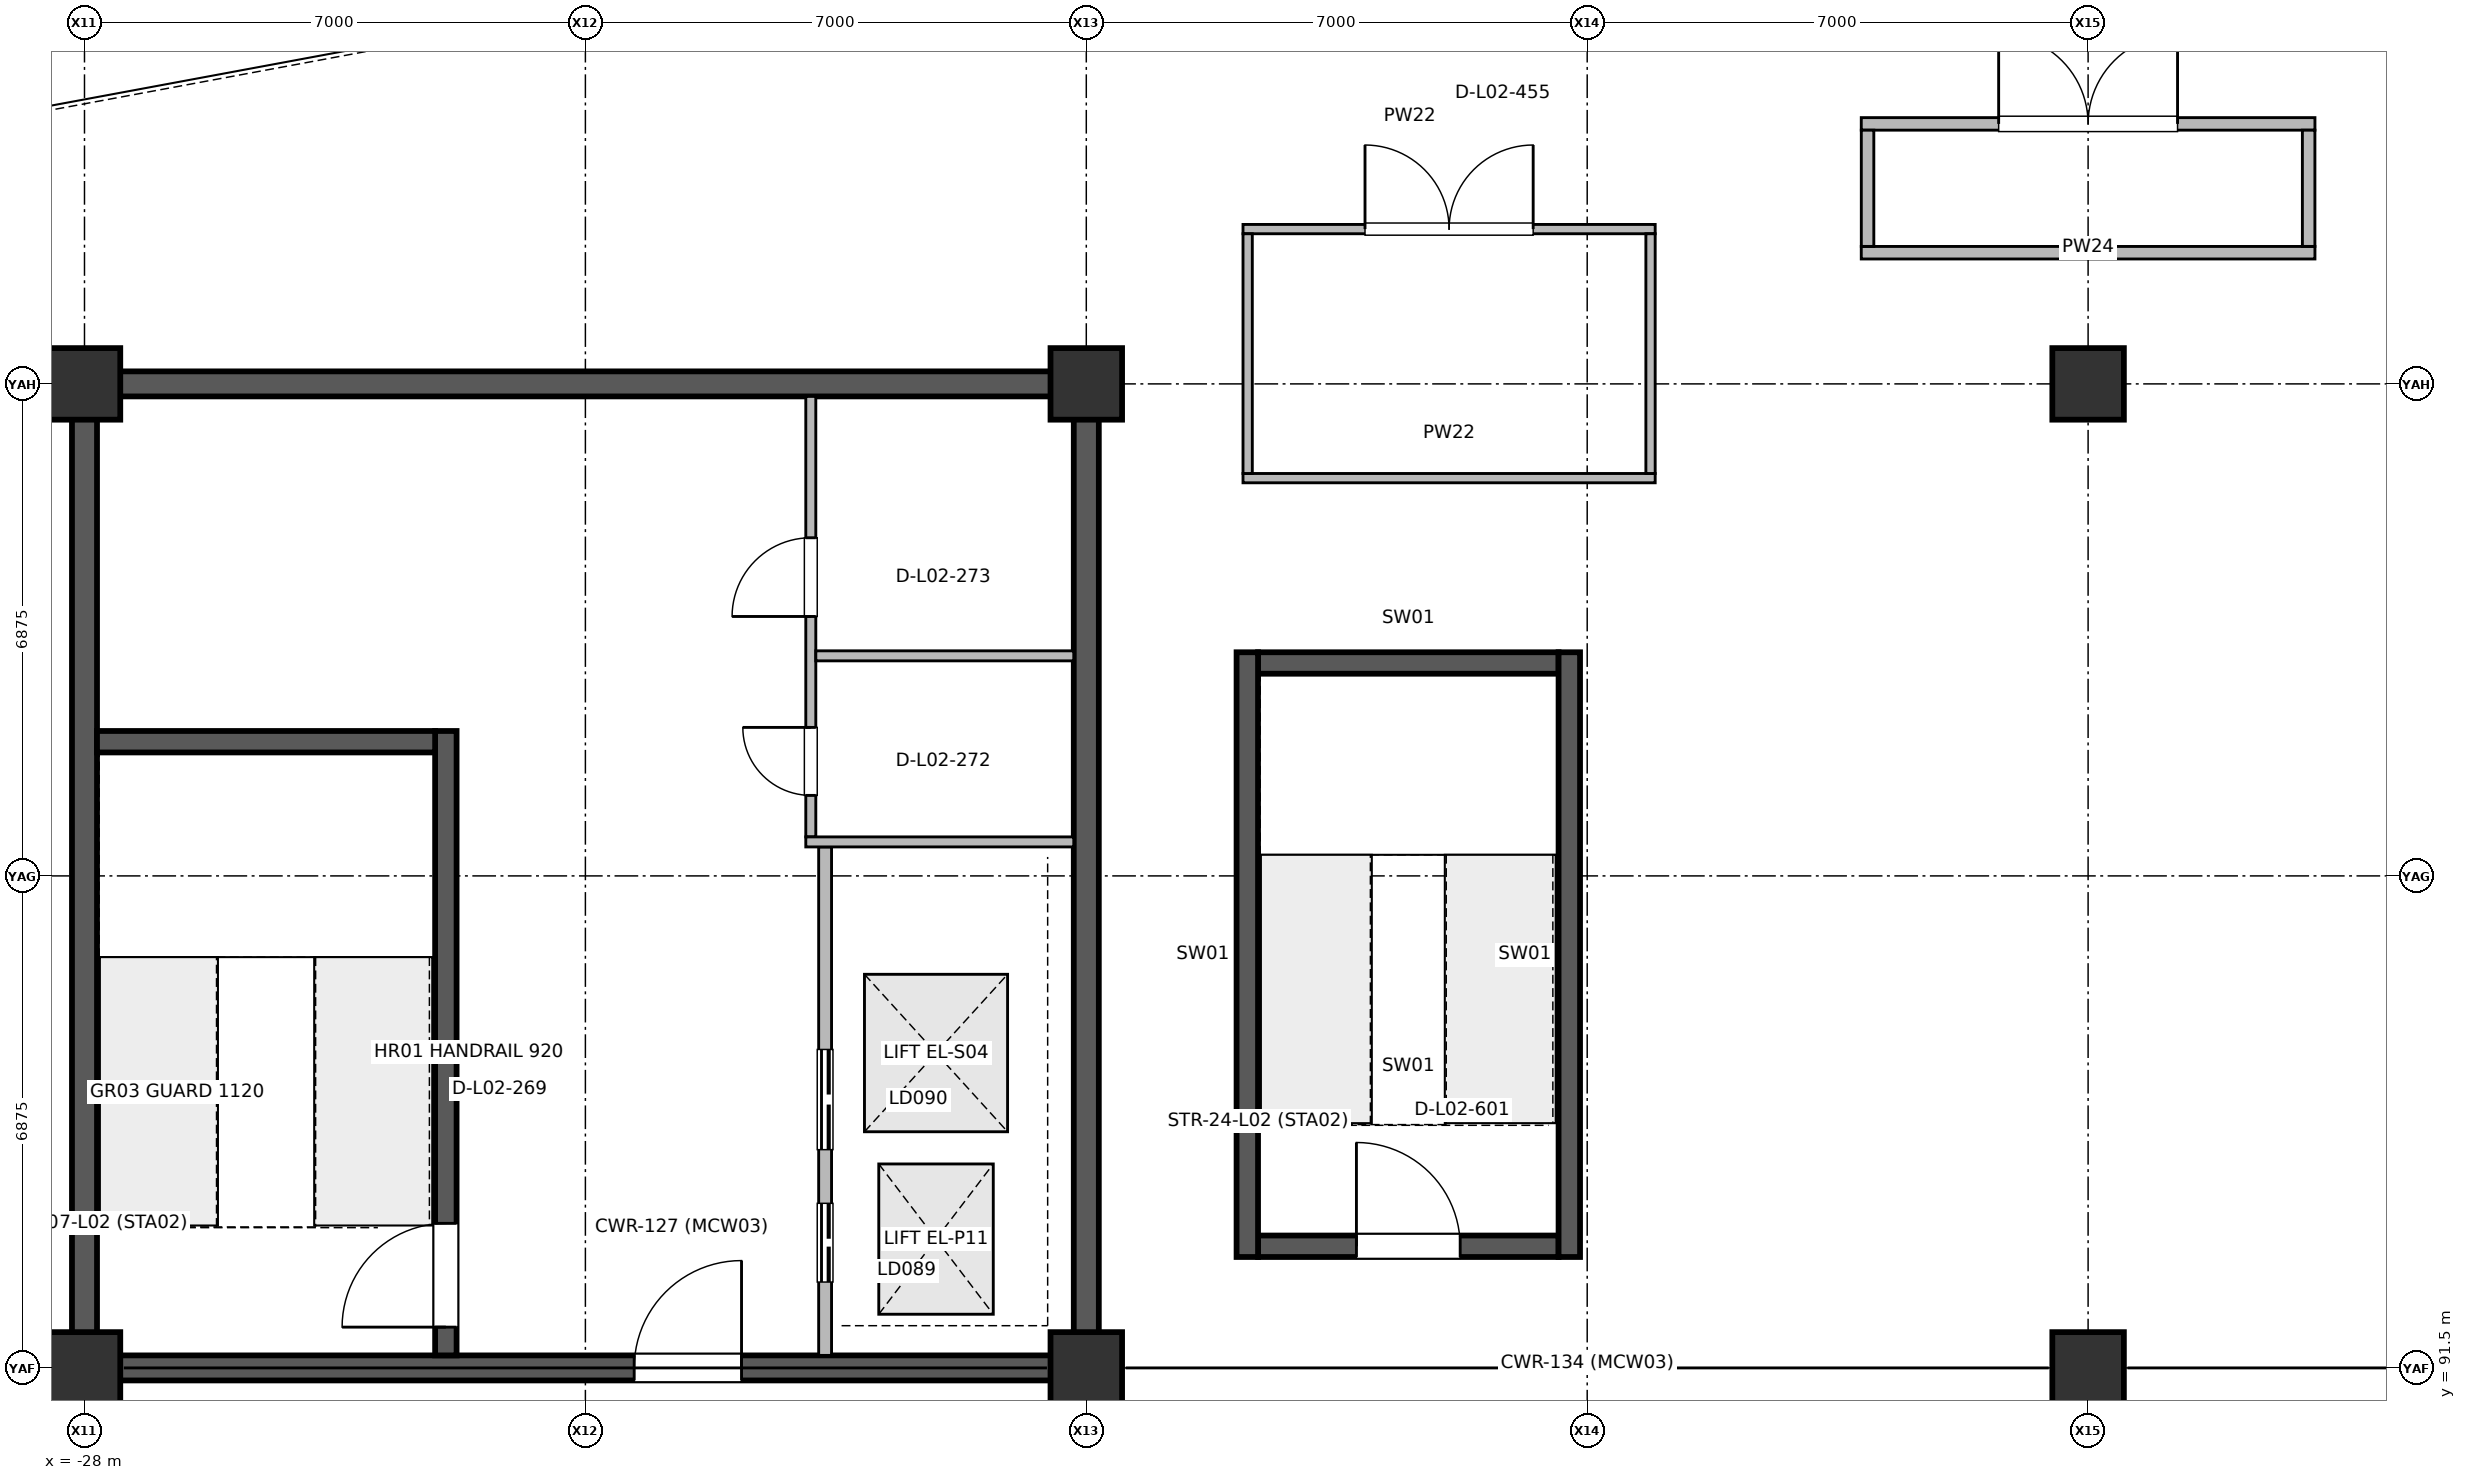
"""IFC4 building model, lengths in metres.
Left out: names, types, materials, properties, quantities, classifications, styles, units other than length and angle.
Written with IfcOpenShell. Run it as: python <this file> out.ifc"""

import sys

from ifc_helpers import new_model, si_unit, direction, frame, frame_2d, origin, origin_2d, place, context, subcontext, project, spatial, rectangle, circle, extrude, element, fill, save


model = new_model("IFC4")
c1 = context("Model", 3, precision=1e-05, world=origin(), true_north=direction((0.0, 1.0)))
c2 = subcontext(c1, "Body", "Model", "MODEL_VIEW")
j1 = project(units=[si_unit("LENGTHUNIT", "METRE"), si_unit("PLANEANGLEUNIT", "RADIAN")], contexts=[c1])
p1 = place(None, origin())
s1 = spatial("IfcSite", under=j1, at=p1, CompositionType="ELEMENT")
p2 = place(p1, origin())
s2 = spatial("IfcBuilding", under=s1, at=p2, CompositionType="ELEMENT")
p3 = place(p2, frame((0.0, 0.0, 6.0)))
s3 = spatial("IfcBuildingStorey", under=s2, at=p3, CompositionType="ELEMENT", Elevation=6.0)
for number, where, z_axis, x_axis in (
    (1, (-28.0, 91.5, 0.0), (0.0, 0.0, 1.0), (1.0, 0.0, 0.0)),
    (2, (-28.0, 105.25, 0.0), (0.0, 0.0, 1.0), (1.0, 0.0, 0.0)),
    (3, (-14.0, 91.5, 0.0), (0.0, 0.0, 1.0), (1.0, 0.0, 0.0)),
    (4, (-14.0, 105.25, 0.0), (0.0, 0.0, 1.0), (1.0, 0.0, 0.0)),
    (5, (0.0, 91.5, 0.0), (0.0, 0.0, 1.0), (1.0, 0.0, 0.0)),
    (6, (0.0, 105.25, 0.0), (0.0, 0.0, 1.0), (1.0, 0.0, 0.0)),
):
    element("IfcColumn", number, at=place(p3, frame(where, z_axis=z_axis, x_axis=x_axis)), inside=s3, PredefinedType="COLUMN", context=c2, shape_type="SweptSolid", body=[
        extrude(circle(Radius=0.5, at=origin_2d()), origin(), (0.0, 0.0, 1.0), 5.398),
    ])
for number, where, z_axis, x_axis in (
    (7, (-28.0, 91.675, 0.0), (0.0, 0.0, 1.0), (0.0, 1.0, 0.0)),
    (8, (-14.0, 91.675, 0.0), (0.0, 0.0, 1.0), (0.0, 1.0, 0.0)),
):
    element("IfcWall", number, at=place(p3, frame(where, z_axis=z_axis, x_axis=x_axis)), inside=s3, PredefinedType="SHEAR", context=c2, shape_type="SweptSolid", body=[
        extrude(rectangle(XDim=13.4, YDim=0.35, at=frame_2d((6.7, 0.0))), origin(), (0.0, 0.0, 1.0), 5.2),
    ])
p4 = place(p3, frame((-27.825, 91.5, 0.0), z_axis=(0.0, 0.0, 1.0), x_axis=(1.0, 0.0, 0.0)))
e9 = element("IfcWall", 9, at=p4, inside=s3, PredefinedType="SHEAR", context=c2, shape_type="SweptSolid", body=[
    extrude(rectangle(XDim=13.65, YDim=0.35, at=frame_2d((6.825, 0.0))), origin(), (0.0, 0.0, 1.0), 5.2),
])
p5 = place(p4, frame((7.507, 0.0, 0.0)))
e10 = element("IfcOpeningElement", 10, at=p5, cuts=e9, PredefinedType="OPENING", context=c2, shape_type="SweptSolid", body=[
    extrude(rectangle(XDim=1.5, YDim=2.2, at=frame_2d((0.75, 1.1))), frame((0.0, 0.185, 0.0), z_axis=(0.0, -1.0, 0.0), x_axis=(1.0, 0.0, 0.0)), (0.0, 0.0, 1.0), 0.37),
])
p6 = place(p3, frame((-27.825, 105.25, 0.0), z_axis=(0.0, 0.0, 1.0), x_axis=(1.0, 0.0, 0.0)))
e11 = element("IfcWall", 11, at=p6, inside=s3, PredefinedType="SHEAR", context=c2, shape_type="SweptSolid", body=[
    extrude(rectangle(XDim=13.65, YDim=0.35, at=frame_2d((6.825, 0.0))), origin(), (0.0, 0.0, 1.0), 5.2),
])
p7 = place(p3, frame((-22.95, 91.675, 0.0), z_axis=(0.0, 0.0, 1.0), x_axis=(0.0, 1.0, 0.0)))
e12 = element("IfcWall", 12, at=p7, inside=s3, PredefinedType="SHEAR", context=c2, shape_type="SweptSolid", body=[
    extrude(rectangle(XDim=8.725, YDim=0.3, at=frame_2d((4.362, 0.0))), origin(), (0.0, 0.0, 1.0), 5.2),
])
p8 = place(p7, frame((0.395, 0.0, 0.0)))
e13 = element("IfcOpeningElement", 13, at=p8, cuts=e12, PredefinedType="OPENING", context=c2, shape_type="SweptSolid", body=[
    extrude(rectangle(XDim=1.45, YDim=2.2, at=frame_2d((0.725, 1.1))), frame((0.0, 0.16, 0.0), z_axis=(0.0, -1.0, 0.0), x_axis=(1.0, 0.0, 0.0)), (0.0, 0.0, 1.0), 0.32),
])
p9 = place(p3, frame((-17.65, 91.675, 0.0), z_axis=(0.0, 0.0, 1.0), x_axis=(0.0, 1.0, 0.0)))
e14 = element("IfcWall", 14, at=p9, inside=s3, PredefinedType="PARTITIONING", context=c2, shape_type="SweptSolid", body=[
    extrude(rectangle(XDim=7.105, YDim=0.18, at=frame_2d((3.552, 0.0))), origin(), (0.0, 0.0, 1.0), 4.42),
])
p10 = place(p9, frame((1.025, 0.0, 0.0)))
e15 = element("IfcOpeningElement", 15, at=p10, cuts=e14, PredefinedType="OPENING", context=c2, shape_type="SweptSolid", body=[
    extrude(rectangle(XDim=1.1, YDim=2.2, at=frame_2d((0.55, 1.1))), frame((0.0, 0.1, 0.0), z_axis=(0.0, -1.0, 0.0), x_axis=(1.0, 0.0, 0.0)), (0.0, 0.0, 1.0), 0.2),
])
p11 = place(p9, frame((2.875, 0.0, 0.0)))
e16 = element("IfcOpeningElement", 16, at=p11, cuts=e14, PredefinedType="OPENING", context=c2, shape_type="SweptSolid", body=[
    extrude(rectangle(XDim=1.4, YDim=2.3, at=frame_2d((0.7, 1.15))), frame((0.0, 0.1, 0.0), z_axis=(0.0, -1.0, 0.0), x_axis=(1.0, 0.0, 0.0)), (0.0, 0.0, 1.0), 0.2),
])
p12 = place(p3, frame((-17.85, 98.92, 0.0), z_axis=(0.0, 0.0, 1.0), x_axis=(0.0, 1.0, 0.0)))
e17 = element("IfcWall", 17, at=p12, inside=s3, PredefinedType="PARTITIONING", context=c2, shape_type="SweptSolid", body=[
    extrude(rectangle(XDim=6.155, YDim=0.14, at=frame_2d((3.078, 0.0))), origin(), (0.0, 0.0, 1.0), 4.42),
])
p13 = place(p12, frame((0.58, 0.0, 0.0)))
e18 = element("IfcOpeningElement", 18, at=p13, cuts=e17, PredefinedType="OPENING", context=c2, shape_type="SweptSolid", body=[
    extrude(rectangle(XDim=0.95, YDim=2.15, at=frame_2d((0.475, 1.075))), frame((0.0, 0.08, 0.0), z_axis=(0.0, -1.0, 0.0), x_axis=(1.0, 0.0, 0.0)), (0.0, 0.0, 1.0), 0.16),
])
p14 = place(p12, frame((3.08, 0.0, 0.0)))
e19 = element("IfcOpeningElement", 19, at=p14, cuts=e17, PredefinedType="OPENING", context=c2, shape_type="SweptSolid", body=[
    extrude(rectangle(XDim=1.1, YDim=2.15, at=frame_2d((0.55, 1.075))), frame((0.0, 0.08, 0.0), z_axis=(0.0, -1.0, 0.0), x_axis=(1.0, 0.0, 0.0)), (0.0, 0.0, 1.0), 0.16),
])
p15 = place(p3, frame((-11.81, 107.413, 0.0), z_axis=(0.0, 0.0, 1.0), x_axis=(1.0, 0.0, 0.0)))
e20 = element("IfcWall", 20, at=p15, inside=s3, PredefinedType="PARTITIONING", context=c2, shape_type="SweptSolid", body=[
    extrude(rectangle(XDim=5.76, YDim=0.13, at=frame_2d((2.88, 0.0))), origin(), (0.0, 0.0, 1.0), 4.42),
])
p16 = place(p15, frame((1.705, 0.0, 0.0)))
e21 = element("IfcOpeningElement", 21, at=p16, cuts=e20, PredefinedType="OPENING", context=c2, shape_type="SweptSolid", body=[
    extrude(rectangle(XDim=2.35, YDim=2.5, at=frame_2d((1.175, 1.25))), frame((0.0, 0.075, 0.0), z_axis=(0.0, -1.0, 0.0), x_axis=(1.0, 0.0, 0.0)), (0.0, 0.0, 1.0), 0.15),
])
p17 = place(p3, frame((-3.17, 108.883, 0.0), z_axis=(0.0, 0.0, 1.0), x_axis=(1.0, 0.0, 0.0)))
e22 = element("IfcWall", 22, at=p17, inside=s3, PredefinedType="PARTITIONING", context=c2, shape_type="SweptSolid", body=[
    extrude(rectangle(XDim=6.34, YDim=0.175, at=frame_2d((3.17, 0.0))), origin(), (0.0, 0.0, 1.0), 4.42),
])
p18 = place(p17, frame((1.92, 0.0, 0.0)))
e23 = element("IfcOpeningElement", 23, at=p18, cuts=e22, PredefinedType="OPENING", context=c2, shape_type="SweptSolid", body=[
    extrude(rectangle(XDim=2.5, YDim=2.5, at=frame_2d((1.25, 1.25))), frame((0.0, 0.097, 0.0), z_axis=(0.0, -1.0, 0.0), x_axis=(1.0, 0.0, 0.0)), (0.0, 0.0, 1.0), 0.195),
])
p19 = place(p3, frame((-17.92, 98.85, 0.0), z_axis=(0.0, 0.0, 1.0), x_axis=(1.0, 0.0, 0.0)))
e24 = element("IfcWall", 24, at=p19, inside=s3, PredefinedType="PARTITIONING", context=c2, shape_type="SweptSolid", body=[
    extrude(rectangle(XDim=3.745, YDim=0.14, at=frame_2d((1.873, 0.0))), origin(), (0.0, 0.0, 1.0), 4.42),
])
p20 = place(p3, frame((-17.78, 101.45, 0.0), z_axis=(0.0, 0.0, 1.0), x_axis=(1.0, 0.0, 0.0)))
e25 = element("IfcWall", 25, at=p20, inside=s3, PredefinedType="PARTITIONING", context=c2, shape_type="SweptSolid", body=[
    extrude(rectangle(XDim=3.605, YDim=0.14, at=frame_2d((1.802, 0.0))), origin(), (0.0, 0.0, 1.0), 4.42),
])
p21 = place(p3, frame((-11.81, 103.933, 0.0), z_axis=(0.0, 0.0, 1.0), x_axis=(1.0, 0.0, 0.0)))
e26 = element("IfcWall", 26, at=p21, inside=s3, PredefinedType="PARTITIONING", context=c2, shape_type="SweptSolid", body=[
    extrude(rectangle(XDim=5.76, YDim=0.13, at=frame_2d((2.88, 0.0))), origin(), (0.0, 0.0, 1.0), 4.42),
])
for number, where, z_axis, x_axis in (
    (27, (-11.745, 103.998, 0.0), (0.0, 0.0, 1.0), (0.0, 1.0, 0.0)),
    (28, (-6.115, 103.998, 0.0), (0.0, 0.0, 1.0), (0.0, 1.0, 0.0)),
):
    element("IfcWall", number, at=place(p3, frame(where, z_axis=z_axis, x_axis=x_axis)), inside=s3, PredefinedType="PARTITIONING", context=c2, shape_type="SweptSolid", body=[
        extrude(rectangle(XDim=3.35, YDim=0.13, at=frame_2d((1.675, 0.0))), origin(), (0.0, 0.0, 1.0), 4.075),
    ])
p22 = place(p3, frame((-3.17, 107.083, 0.0), z_axis=(0.0, 0.0, 1.0), x_axis=(1.0, 0.0, 0.0)))
e29 = element("IfcWall", 29, at=p22, inside=s3, PredefinedType="PARTITIONING", context=c2, shape_type="SweptSolid", body=[
    extrude(rectangle(XDim=6.34, YDim=0.175, at=frame_2d((3.17, 0.0))), origin(), (0.0, 0.0, 1.0), 4.42),
])
for number, where, z_axis, x_axis in (
    (30, (-3.082, 107.171, 0.0), (0.0, 0.0, 1.0), (0.0, 1.0, 0.0)),
    (31, (3.082, 107.171, 0.0), (0.0, 0.0, 1.0), (0.0, 1.0, 0.0)),
):
    element("IfcWall", number, at=place(p3, frame(where, z_axis=z_axis, x_axis=x_axis)), inside=s3, PredefinedType="PARTITIONING", context=c2, shape_type="SweptSolid", body=[
        extrude(rectangle(XDim=1.624, YDim=0.175, at=frame_2d((0.812, 0.0))), origin(), (0.0, 0.0, 1.0), 4.42),
    ])
p23 = place(p3, frame((-27.825, 100.25, 0.0), z_axis=(0.0, 0.0, 1.0), x_axis=(1.0, 0.0, 0.0)))
e32 = element("IfcWall", 32, at=p23, inside=s3, PredefinedType="SHEAR", context=c2, shape_type="SweptSolid", body=[
    extrude(rectangle(XDim=4.725, YDim=0.3, at=frame_2d((2.362, 0.0))), origin(), (0.0, 0.0, 1.0), 5.2),
])
p24 = place(p3, frame((-11.6, 93.2, 0.0), z_axis=(0.0, 0.0, 1.0), x_axis=(1.0, 0.0, 0.0)))
e33 = element("IfcWall", 33, at=p24, inside=s3, PredefinedType="SHEAR", context=c2, shape_type="SweptSolid", body=[
    extrude(rectangle(XDim=4.2, YDim=0.3, at=frame_2d((2.1, 0.0))), origin(), (0.0, 0.0, 1.0), 5.2),
])
p25 = place(p24, frame((1.375, 0.0, 0.0)))
e34 = element("IfcOpeningElement", 34, at=p25, cuts=e33, PredefinedType="OPENING", context=c2, shape_type="SweptSolid", body=[
    extrude(rectangle(XDim=1.45, YDim=2.2, at=frame_2d((0.725, 1.1))), frame((0.0, 0.16, 0.0), z_axis=(0.0, -1.0, 0.0), x_axis=(1.0, 0.0, 0.0)), (0.0, 0.0, 1.0), 0.32),
])
p26 = place(p3, frame((-11.6, 101.35, 0.0), z_axis=(0.0, 0.0, 1.0), x_axis=(1.0, 0.0, 0.0)))
e35 = element("IfcWall", 35, at=p26, inside=s3, PredefinedType="SHEAR", context=c2, shape_type="SweptSolid", body=[
    extrude(rectangle(XDim=4.2, YDim=0.3, at=frame_2d((2.1, 0.0))), origin(), (0.0, 0.0, 1.0), 5.2),
])
for number, where, z_axis, x_axis in (
    (36, (-11.75, 93.05, 0.0), (0.0, 0.0, 1.0), (0.0, 1.0, 0.0)),
    (37, (-7.25, 93.05, 0.0), (0.0, 0.0, 1.0), (0.0, 1.0, 0.0)),
):
    element("IfcWall", number, at=place(p3, frame(where, z_axis=z_axis, x_axis=x_axis)), inside=s3, PredefinedType="SHEAR", context=c2, shape_type="SweptSolid", body=[
        extrude(rectangle(XDim=8.45, YDim=0.3, at=frame_2d((4.225, 0.0))), origin(), (0.0, 0.0, 1.0), 5.2),
    ])
p27 = place(p5, origin())
e38 = element("IfcDoor", 38, at=p27, inside=s3, OperationType="SINGLE_SWING_RIGHT", PredefinedType="DOOR", context=c2, shape_type="SweptSolid", body=[
    extrude(rectangle(XDim=1.5, YDim=2.2, at=frame_2d((0.75, 1.1))), frame((0.0, 0.025, 0.0), z_axis=(0.0, -1.0, 0.0), x_axis=(1.0, 0.0, 0.0)), (0.0, 0.0, 1.0), 0.05),
])
fill(e10, e38)
p28 = place(p8, origin())
e39 = element("IfcDoor", 39, at=p28, inside=s3, OperationType="SINGLE_SWING_LEFT", PredefinedType="DOOR", context=c2, shape_type="SweptSolid", body=[
    extrude(rectangle(XDim=1.45, YDim=2.2, at=frame_2d((0.725, 1.1))), frame((0.0, 0.025, 0.0), z_axis=(0.0, -1.0, 0.0), x_axis=(1.0, 0.0, 0.0)), (0.0, 0.0, 1.0), 0.05),
])
fill(e13, e39)
p29 = place(p10, origin())
e40 = element("IfcDoor", 40, at=p29, inside=s3, OperationType="DOUBLE_DOOR_SLIDING", PredefinedType="DOOR", context=c2, shape_type="SweptSolid", body=[
    extrude(rectangle(XDim=1.1, YDim=2.2, at=frame_2d((0.55, 1.1))), frame((0.0, 0.025, 0.0), z_axis=(0.0, -1.0, 0.0), x_axis=(1.0, 0.0, 0.0)), (0.0, 0.0, 1.0), 0.05),
])
fill(e15, e40)
p30 = place(p11, origin())
e41 = element("IfcDoor", 41, at=p30, inside=s3, OperationType="DOUBLE_DOOR_SLIDING", PredefinedType="DOOR", context=c2, shape_type="SweptSolid", body=[
    extrude(rectangle(XDim=1.4, YDim=2.3, at=frame_2d((0.7, 1.15))), frame((0.0, 0.025, 0.0), z_axis=(0.0, -1.0, 0.0), x_axis=(1.0, 0.0, 0.0)), (0.0, 0.0, 1.0), 0.05),
])
fill(e16, e41)
p31 = place(p13, origin())
e42 = element("IfcDoor", 42, at=p31, inside=s3, OperationType="SINGLE_SWING_RIGHT", PredefinedType="DOOR", context=c2, shape_type="SweptSolid", body=[
    extrude(rectangle(XDim=0.95, YDim=2.15, at=frame_2d((0.475, 1.075))), frame((0.0, 0.025, 0.0), z_axis=(0.0, -1.0, 0.0), x_axis=(1.0, 0.0, 0.0)), (0.0, 0.0, 1.0), 0.05),
])
fill(e18, e42)
p32 = place(p14, origin())
e43 = element("IfcDoor", 43, at=p32, inside=s3, OperationType="SINGLE_SWING_LEFT", PredefinedType="DOOR", context=c2, shape_type="SweptSolid", body=[
    extrude(rectangle(XDim=1.1, YDim=2.15, at=frame_2d((0.55, 1.075))), frame((0.0, 0.025, 0.0), z_axis=(0.0, -1.0, 0.0), x_axis=(1.0, 0.0, 0.0)), (0.0, 0.0, 1.0), 0.05),
])
fill(e19, e43)
p33 = place(p16, origin())
e44 = element("IfcDoor", 44, at=p33, inside=s3, OperationType="DOUBLE_DOOR_SINGLE_SWING", PredefinedType="DOOR", context=c2, shape_type="SweptSolid", body=[
    extrude(rectangle(XDim=2.35, YDim=2.5, at=frame_2d((1.175, 1.25))), frame((0.0, 0.025, 0.0), z_axis=(0.0, -1.0, 0.0), x_axis=(1.0, 0.0, 0.0)), (0.0, 0.0, 1.0), 0.05),
])
fill(e21, e44)
p34 = place(p18, origin())
e45 = element("IfcDoor", 45, at=p34, inside=s3, OperationType="DOUBLE_DOOR_SINGLE_SWING", PredefinedType="DOOR", context=c2, shape_type="SweptSolid", body=[
    extrude(rectangle(XDim=2.5, YDim=2.5, at=frame_2d((1.25, 1.25))), frame((0.0, 0.025, 0.0), z_axis=(0.0, -1.0, 0.0), x_axis=(1.0, 0.0, 0.0)), (0.0, 0.0, 1.0), 0.05),
])
fill(e23, e45)
p35 = place(p25, origin())
e46 = element("IfcDoor", 46, at=p35, inside=s3, OperationType="SINGLE_SWING_LEFT", PredefinedType="DOOR", context=c2, shape_type="SweptSolid", body=[
    extrude(rectangle(XDim=1.45, YDim=2.2, at=frame_2d((0.725, 1.1))), frame((0.0, 0.025, 0.0), z_axis=(0.0, -1.0, 0.0), x_axis=(1.0, 0.0, 0.0)), (0.0, 0.0, 1.0), 0.05),
])
fill(e34, e46)
save(model, sys.argv[1])
